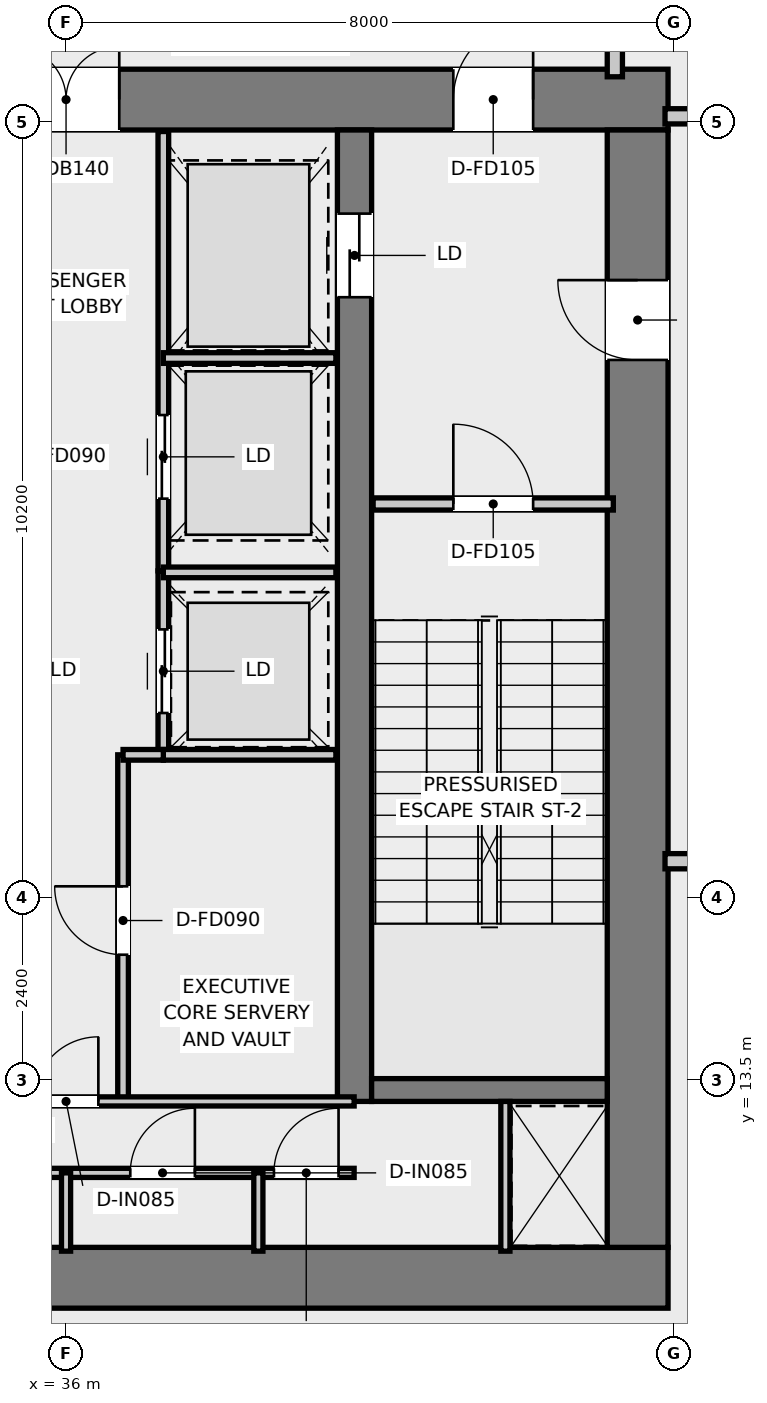
"""IFC4 building model, lengths in metres.
Left out: names, types, materials, properties, quantities, classifications, styles, units other than length and angle.
Written with IfcOpenShell. Run it as: python <this file> out.ifc"""

import sys

from ifc_helpers import new_model, si_unit, direction, frame, frame_2d, origin, place, context, subcontext, project, spatial, rectangle, extrude, element, fill, save


model = new_model("IFC4")
c1 = context("Model", 3, precision=1e-05, world=origin(), true_north=direction((0.0, 1.0)))
c2 = subcontext(c1, "Body", "Model", "MODEL_VIEW")
j1 = project(units=[si_unit("LENGTHUNIT", "METRE"), si_unit("PLANEANGLEUNIT", "RADIAN")], contexts=[c1])
p1 = place(None, origin())
s1 = spatial("IfcSite", under=j1, at=p1, CompositionType="ELEMENT")
p2 = place(p1, origin())
s2 = spatial("IfcBuilding", under=s1, at=p2, CompositionType="ELEMENT")
p3 = place(p2, frame((0.0, 0.0, 318.75)))
s3 = spatial("IfcBuildingStorey", under=s2, at=p3, CompositionType="ELEMENT", Elevation=318.75)
p4 = place(p3, frame((28.08, 10.9, 0.0), z_axis=(0.0, 0.0, 1.0), x_axis=(1.0, 0.0, 0.0)))
e1 = element("IfcWall", 1, at=p4, inside=s3, PredefinedType="SHEAR", context=c2, shape_type="SweptSolid", body=[
    extrude(rectangle(XDim=15.84, YDim=0.8, at=frame_2d((7.92, 0.0))), origin(), (0.0, 0.0, 1.0), 5.0),
])
p5 = place(p3, frame((28.08, 26.4, 0.0), z_axis=(0.0, 0.0, 1.0), x_axis=(1.0, 0.0, 0.0)))
e2 = element("IfcWall", 2, at=p5, inside=s3, PredefinedType="SHEAR", context=c2, shape_type="SweptSolid", body=[
    extrude(rectangle(XDim=15.84, YDim=0.8, at=frame_2d((7.92, 0.0))), origin(), (0.0, 0.0, 1.0), 5.0),
])
p6 = place(p5, frame((7.22, 0.0, 0.0)))
e3 = element("IfcOpeningElement", 3, at=p6, cuts=e2, PredefinedType="OPENING", context=c2, shape_type="SweptSolid", body=[
    extrude(rectangle(XDim=1.4, YDim=2.2, at=frame_2d((0.7, 1.1))), frame((0.0, 0.41, 0.0), z_axis=(0.0, -1.0, 0.0), x_axis=(1.0, 0.0, 0.0)), (0.0, 0.0, 1.0), 0.82),
])
p7 = place(p5, frame((1.775, 0.0, 0.0)))
e4 = element("IfcOpeningElement", 4, at=p7, cuts=e2, PredefinedType="OPENING", context=c2, shape_type="SweptSolid", body=[
    extrude(rectangle(XDim=1.05, YDim=2.1, at=frame_2d((0.525, 1.05))), frame((0.0, 0.41, 0.0), z_axis=(0.0, -1.0, 0.0), x_axis=(1.0, 0.0, 0.0)), (0.0, 0.0, 1.0), 0.82),
])
p8 = place(p5, frame((13.015, 0.0, 0.0)))
e5 = element("IfcOpeningElement", 5, at=p8, cuts=e2, PredefinedType="OPENING", context=c2, shape_type="SweptSolid", body=[
    extrude(rectangle(XDim=1.05, YDim=2.1, at=frame_2d((0.525, 1.05))), frame((0.0, 0.41, 0.0), z_axis=(0.0, -1.0, 0.0), x_axis=(1.0, 0.0, 0.0)), (0.0, 0.0, 1.0), 0.82),
])
p9 = place(p3, frame((43.52, 11.3, 0.0), z_axis=(0.0, 0.0, 1.0), x_axis=(0.0, 1.0, 0.0)))
e6 = element("IfcWall", 6, at=p9, inside=s3, PredefinedType="SHEAR", context=c2, shape_type="SweptSolid", body=[
    extrude(rectangle(XDim=14.7, YDim=0.8, at=frame_2d((7.35, 0.0))), origin(), (0.0, 0.0, 1.0), 5.0),
])
p10 = place(p9, frame((11.675, 0.0, 0.0)))
e7 = element("IfcOpeningElement", 7, at=p10, cuts=e6, PredefinedType="OPENING", context=c2, shape_type="SweptSolid", body=[
    extrude(rectangle(XDim=1.05, YDim=2.1, at=frame_2d((0.525, 1.05))), frame((0.0, 0.41, 0.0), z_axis=(0.0, -1.0, 0.0), x_axis=(1.0, 0.0, 0.0)), (0.0, 0.0, 1.0), 0.82),
])
p11 = place(p3, frame((39.795, 13.22, 0.0), z_axis=(0.0, 0.0, 1.0), x_axis=(0.0, 1.0, 0.0)))
e8 = element("IfcWall", 8, at=p11, inside=s3, PredefinedType="SHEAR", context=c2, shape_type="SweptSolid", body=[
    extrude(rectangle(XDim=12.78, YDim=0.45, at=frame_2d((6.39, 0.0))), origin(), (0.0, 0.0, 1.0), 5.0),
])
p12 = place(p11, frame((10.58, 0.0, 0.0)))
e9 = element("IfcOpeningElement", 9, at=p12, cuts=e8, PredefinedType="OPENING", context=c2, shape_type="SweptSolid", body=[
    extrude(rectangle(XDim=1.1, YDim=2.15, at=frame_2d((0.55, 1.075))), frame((0.0, 0.235, 0.0), z_axis=(0.0, -1.0, 0.0), x_axis=(1.0, 0.0, 0.0)), (0.0, 0.0, 1.0), 0.47),
])
p13 = place(p3, frame((40.02, 13.37, 0.0), z_axis=(0.0, 0.0, 1.0), x_axis=(1.0, 0.0, 0.0)))
e10 = element("IfcWall", 10, at=p13, inside=s3, PredefinedType="SHEAR", context=c2, shape_type="SweptSolid", body=[
    extrude(rectangle(XDim=3.1, YDim=0.3, at=frame_2d((1.55, 0.0))), origin(), (0.0, 0.0, 1.0), 5.0),
])
p14 = place(p3, frame((40.04, 21.08, 0.0), z_axis=(0.0, 0.0, 1.0), x_axis=(1.0, 0.0, 0.0)))
e11 = element("IfcWall", 11, at=p14, inside=s3, PredefinedType="PARTITIONING", context=c2, shape_type="SweptSolid", body=[
    extrude(rectangle(XDim=3.16, YDim=0.16, at=frame_2d((1.58, 0.0))), origin(), (0.0, 0.0, 1.0), 4.72),
])
p15 = place(p14, frame((1.055, 0.0, 0.0)))
e12 = element("IfcOpeningElement", 12, at=p15, cuts=e11, PredefinedType="OPENING", context=c2, shape_type="SweptSolid", body=[
    extrude(rectangle(XDim=1.05, YDim=2.1, at=frame_2d((0.525, 1.05))), frame((0.0, 0.09, 0.0), z_axis=(0.0, -1.0, 0.0), x_axis=(1.0, 0.0, 0.0)), (0.0, 0.0, 1.0), 0.18),
])
p16 = place(p3, frame((37.28, 20.2, 0.0), z_axis=(0.0, 0.0, 1.0), x_axis=(0.0, 1.0, 0.0)))
e13 = element("IfcWall", 13, at=p16, inside=s3, PredefinedType="PARTITIONING", context=c2, shape_type="SweptSolid", body=[
    extrude(rectangle(XDim=5.78, YDim=0.14, at=frame_2d((2.89, 0.0))), origin(), (0.0, 0.0, 1.0), 3.87),
])
p17 = place(p16, frame((0.95, 0.0, 0.0)))
e14 = element("IfcOpeningElement", 14, at=p17, cuts=e13, PredefinedType="OPENING", context=c2, shape_type="SweptSolid", body=[
    extrude(rectangle(XDim=1.1, YDim=2.15, at=frame_2d((0.55, 1.075))), frame((0.0, 0.08, 0.0), z_axis=(0.0, -1.0, 0.0), x_axis=(1.0, 0.0, 0.0)), (0.0, 0.0, 1.0), 0.16),
])
p18 = place(p3, frame((37.28, 23.0, 0.0), z_axis=(0.0, 0.0, 1.0), x_axis=(1.0, 0.0, 0.0)))
e15 = element("IfcWall", 15, at=p18, inside=s3, PredefinedType="PARTITIONING", context=c2, shape_type="SweptSolid", body=[
    extrude(rectangle(XDim=2.27, YDim=0.14, at=frame_2d((1.135, 0.0))), origin(), (0.0, 0.0, 1.0), 3.87),
])
p19 = place(p3, frame((37.28, 17.78, 0.0), z_axis=(0.0, 0.0, 1.0), x_axis=(0.0, 1.0, 0.0)))
e16 = element("IfcWall", 16, at=p19, inside=s3, PredefinedType="PARTITIONING", context=c2, shape_type="SweptSolid", body=[
    extrude(rectangle(XDim=2.42, YDim=0.14, at=frame_2d((1.21, 0.0))), origin(), (0.0, 0.0, 1.0), 4.72),
])
p20 = place(p19, frame((0.55, 0.0, 0.0)))
e17 = element("IfcOpeningElement", 17, at=p20, cuts=e16, PredefinedType="OPENING", context=c2, shape_type="SweptSolid", body=[
    extrude(rectangle(XDim=1.1, YDim=2.15, at=frame_2d((0.55, 1.075))), frame((0.0, 0.08, 0.0), z_axis=(0.0, -1.0, 0.0), x_axis=(1.0, 0.0, 0.0)), (0.0, 0.0, 1.0), 0.16),
])
for number, where, z_axis, x_axis in (
    (18, (37.28, 17.78, 0.0), (0.0, 0.0, 1.0), (1.0, 0.0, 0.0)),
    (19, (37.28, 20.18, 0.0), (0.0, 0.0, 1.0), (1.0, 0.0, 0.0)),
):
    element("IfcWall", number, at=place(p3, frame(where, z_axis=z_axis, x_axis=x_axis)), inside=s3, PredefinedType="PARTITIONING", context=c2, shape_type="SweptSolid", body=[
        extrude(rectangle(XDim=2.27, YDim=0.14, at=frame_2d((1.135, 0.0))), origin(), (0.0, 0.0, 1.0), 4.72),
    ])
p21 = place(p3, frame((36.75, 13.22, 0.0), z_axis=(0.0, 0.0, 1.0), x_axis=(0.0, 1.0, 0.0)))
e20 = element("IfcWall", 20, at=p21, inside=s3, PredefinedType="PARTITIONING", context=c2, shape_type="SweptSolid", body=[
    extrude(rectangle(XDim=4.56, YDim=0.14, at=frame_2d((2.28, 0.0))), origin(), (0.0, 0.0, 1.0), 4.72),
])
p22 = place(p21, frame((1.93, 0.0, 0.0)))
e21 = element("IfcOpeningElement", 21, at=p22, cuts=e20, PredefinedType="OPENING", context=c2, shape_type="SweptSolid", body=[
    extrude(rectangle(XDim=0.9, YDim=2.1, at=frame_2d((0.45, 1.05))), frame((0.0, 0.08, 0.0), z_axis=(0.0, -1.0, 0.0), x_axis=(1.0, 0.0, 0.0)), (0.0, 0.0, 1.0), 0.16),
])
p23 = place(p3, frame((36.75, 17.78, 0.0), z_axis=(0.0, 0.0, 1.0), x_axis=(1.0, 0.0, 0.0)))
e22 = element("IfcWall", 22, at=p23, inside=s3, PredefinedType="PARTITIONING", context=c2, shape_type="SweptSolid", body=[
    extrude(rectangle(XDim=0.53, YDim=0.14, at=frame_2d((0.265, 0.0))), origin(), (0.0, 0.0, 1.0), 4.72),
])
p24 = place(p3, frame((41.78, 11.25, 0.0), z_axis=(0.0, 0.0, 1.0), x_axis=(0.0, 1.0, 0.0)))
e23 = element("IfcWall", 23, at=p24, inside=s3, PredefinedType="PARTITIONING", context=c2, shape_type="SweptSolid", body=[
    extrude(rectangle(XDim=1.97, YDim=0.12, at=frame_2d((0.985, 0.0))), origin(), (0.0, 0.0, 1.0), 4.72),
])
p25 = place(p3, frame((32.21, 13.22, 0.0), z_axis=(0.0, 0.0, 1.0), x_axis=(1.0, 0.0, 0.0)))
e24 = element("IfcWall", 24, at=p25, inside=s3, PredefinedType="PARTITIONING", context=c2, shape_type="SweptSolid", body=[
    extrude(rectangle(XDim=7.58, YDim=0.12, at=frame_2d((3.79, 0.0))), origin(), (0.0, 0.0, 1.0), 4.72),
])
p26 = place(p25, frame((3.365, 0.0, 0.0)))
e25 = element("IfcOpeningElement", 25, at=p26, cuts=e24, PredefinedType="OPENING", context=c2, shape_type="SweptSolid", body=[
    extrude(rectangle(XDim=0.85, YDim=2.1, at=frame_2d((0.425, 1.05))), frame((0.0, 0.07, 0.0), z_axis=(0.0, -1.0, 0.0), x_axis=(1.0, 0.0, 0.0)), (0.0, 0.0, 1.0), 0.14),
])
p27 = place(p3, frame((32.21, 12.28, 0.0), z_axis=(0.0, 0.0, 1.0), x_axis=(1.0, 0.0, 0.0)))
e26 = element("IfcWall", 26, at=p27, inside=s3, PredefinedType="PARTITIONING", context=c2, shape_type="SweptSolid", body=[
    extrude(rectangle(XDim=7.58, YDim=0.12, at=frame_2d((3.79, 0.0))), origin(), (0.0, 0.0, 1.0), 4.72),
])
p28 = place(p27, frame((0.205, 0.0, 0.0)))
e27 = element("IfcOpeningElement", 27, at=p28, cuts=e26, PredefinedType="OPENING", context=c2, shape_type="SweptSolid", body=[
    extrude(rectangle(XDim=0.85, YDim=2.1, at=frame_2d((0.425, 1.05))), frame((0.0, 0.07, 0.0), z_axis=(0.0, -1.0, 0.0), x_axis=(1.0, 0.0, 0.0)), (0.0, 0.0, 1.0), 0.14),
])
p29 = place(p27, frame((2.095, 0.0, 0.0)))
e28 = element("IfcOpeningElement", 28, at=p29, cuts=e26, PredefinedType="OPENING", context=c2, shape_type="SweptSolid", body=[
    extrude(rectangle(XDim=0.85, YDim=2.1, at=frame_2d((0.425, 1.05))), frame((0.0, 0.07, 0.0), z_axis=(0.0, -1.0, 0.0), x_axis=(1.0, 0.0, 0.0)), (0.0, 0.0, 1.0), 0.14),
])
p30 = place(p27, frame((4.635, 0.0, 0.0)))
e29 = element("IfcOpeningElement", 29, at=p30, cuts=e26, PredefinedType="OPENING", context=c2, shape_type="SweptSolid", body=[
    extrude(rectangle(XDim=0.85, YDim=2.1, at=frame_2d((0.425, 1.05))), frame((0.0, 0.07, 0.0), z_axis=(0.0, -1.0, 0.0), x_axis=(1.0, 0.0, 0.0)), (0.0, 0.0, 1.0), 0.14),
])
p31 = place(p27, frame((6.525, 0.0, 0.0)))
e30 = element("IfcOpeningElement", 30, at=p31, cuts=e26, PredefinedType="OPENING", context=c2, shape_type="SweptSolid", body=[
    extrude(rectangle(XDim=0.85, YDim=2.1, at=frame_2d((0.425, 1.05))), frame((0.0, 0.07, 0.0), z_axis=(0.0, -1.0, 0.0), x_axis=(1.0, 0.0, 0.0)), (0.0, 0.0, 1.0), 0.14),
])
for number, where, z_axis, x_axis in (
    (31, (36.0, 11.25, 0.0), (0.0, 0.0, 1.0), (0.0, 1.0, 0.0)),
    (32, (38.53, 11.25, 0.0), (0.0, 0.0, 1.0), (0.0, 1.0, 0.0)),
):
    element("IfcWall", number, at=place(p3, frame(where, z_axis=z_axis, x_axis=x_axis)), inside=s3, PredefinedType="PARTITIONING", context=c2, shape_type="SweptSolid", body=[
        extrude(rectangle(XDim=1.03, YDim=0.12, at=frame_2d((0.515, 0.0))), origin(), (0.0, 0.0, 1.0), 4.72),
    ])
p32 = place(p3, frame((43.22, 26.7, 0.0), z_axis=(0.0, 0.0, 1.0), x_axis=(0.0, 1.0, 0.0)))
e33 = element("IfcWall", 33, at=p32, inside=s3, PredefinedType="SOLIDWALL", context=c2, shape_type="SweptSolid", body=[
    extrude(rectangle(XDim=12.6, YDim=0.2, at=frame_2d((6.3, 0.0))), origin(), (0.0, 0.0, 1.0), 4.18),
])
p33 = place(p3, frame((43.88, 16.38, 0.0), z_axis=(0.0, 0.0, 1.0), x_axis=(1.0, 0.0, 0.0)))
e34 = element("IfcWall", 34, at=p33, inside=s3, PredefinedType="SOLIDWALL", context=c2, shape_type="SweptSolid", body=[
    extrude(rectangle(XDim=6.07, YDim=0.2, at=frame_2d((3.035, 0.0))), origin(), (0.0, 0.0, 1.0), 4.18),
])
p34 = place(p3, frame((43.88, 26.18, 0.0), z_axis=(0.0, 0.0, 1.0), x_axis=(1.0, 0.0, 0.0)))
e35 = element("IfcWall", 35, at=p34, inside=s3, PredefinedType="SOLIDWALL", context=c2, shape_type="SweptSolid", body=[
    extrude(rectangle(XDim=3.54, YDim=0.2, at=frame_2d((1.77, 0.0))), origin(), (0.0, 0.0, 1.0), 4.18),
])
p35 = place(p15, origin())
e36 = element("IfcDoor", 36, at=p35, inside=s3, OperationType="SINGLE_SWING_LEFT", PredefinedType="DOOR", context=c2, shape_type="SweptSolid", body=[
    extrude(rectangle(XDim=1.05, YDim=2.1, at=frame_2d((0.525, 1.05))), frame((0.0, 0.025, 0.0), z_axis=(0.0, -1.0, 0.0), x_axis=(1.0, 0.0, 0.0)), (0.0, 0.0, 1.0), 0.05),
])
fill(e12, e36)
p36 = place(p6, origin())
e37 = element("IfcDoor", 37, at=p36, inside=s3, OperationType="DOUBLE_DOOR_SINGLE_SWING", PredefinedType="DOOR", context=c2, shape_type="SweptSolid", body=[
    extrude(rectangle(XDim=1.4, YDim=2.2, at=frame_2d((0.7, 1.1))), frame((0.0, 0.025, 0.0), z_axis=(0.0, -1.0, 0.0), x_axis=(1.0, 0.0, 0.0)), (0.0, 0.0, 1.0), 0.05),
])
fill(e3, e37)
p37 = place(p8, origin())
e38 = element("IfcDoor", 38, at=p37, inside=s3, OperationType="SINGLE_SWING_RIGHT", PredefinedType="DOOR", context=c2, shape_type="SweptSolid", body=[
    extrude(rectangle(XDim=1.05, YDim=2.1, at=frame_2d((0.525, 1.05))), frame((0.0, 0.025, 0.0), z_axis=(0.0, -1.0, 0.0), x_axis=(1.0, 0.0, 0.0)), (0.0, 0.0, 1.0), 0.05),
])
fill(e5, e38)
p38 = place(p10, origin())
e39 = element("IfcDoor", 39, at=p38, inside=s3, OperationType="SINGLE_SWING_RIGHT", PredefinedType="DOOR", context=c2, shape_type="SweptSolid", body=[
    extrude(rectangle(XDim=1.05, YDim=2.1, at=frame_2d((0.525, 1.05))), frame((0.0, 0.025, 0.0), z_axis=(0.0, -1.0, 0.0), x_axis=(1.0, 0.0, 0.0)), (0.0, 0.0, 1.0), 0.05),
])
fill(e7, e39)
p39 = place(p12, origin())
e40 = element("IfcDoor", 40, at=p39, inside=s3, OperationType="DOUBLE_DOOR_SLIDING", PredefinedType="DOOR", context=c2, shape_type="SweptSolid", body=[
    extrude(rectangle(XDim=1.1, YDim=2.15, at=frame_2d((0.55, 1.075))), frame((0.0, 0.025, 0.0), z_axis=(0.0, -1.0, 0.0), x_axis=(1.0, 0.0, 0.0)), (0.0, 0.0, 1.0), 0.05),
])
fill(e9, e40)
p40 = place(p17, origin())
e41 = element("IfcDoor", 41, at=p40, inside=s3, OperationType="DOUBLE_DOOR_SLIDING", PredefinedType="DOOR", context=c2, shape_type="SweptSolid", body=[
    extrude(rectangle(XDim=1.1, YDim=2.15, at=frame_2d((0.55, 1.075))), frame((0.0, 0.025, 0.0), z_axis=(0.0, -1.0, 0.0), x_axis=(1.0, 0.0, 0.0)), (0.0, 0.0, 1.0), 0.05),
])
fill(e14, e41)
p41 = place(p20, origin())
e42 = element("IfcDoor", 42, at=p41, inside=s3, OperationType="DOUBLE_DOOR_SLIDING", PredefinedType="DOOR", context=c2, shape_type="SweptSolid", body=[
    extrude(rectangle(XDim=1.1, YDim=2.15, at=frame_2d((0.55, 1.075))), frame((0.0, 0.025, 0.0), z_axis=(0.0, -1.0, 0.0), x_axis=(1.0, 0.0, 0.0)), (0.0, 0.0, 1.0), 0.05),
])
fill(e17, e42)
p42 = place(p22, origin())
e43 = element("IfcDoor", 43, at=p42, inside=s3, OperationType="SINGLE_SWING_RIGHT", PredefinedType="DOOR", context=c2, shape_type="SweptSolid", body=[
    extrude(rectangle(XDim=0.9, YDim=2.1, at=frame_2d((0.45, 1.05))), frame((0.0, 0.025, 0.0), z_axis=(0.0, -1.0, 0.0), x_axis=(1.0, 0.0, 0.0)), (0.0, 0.0, 1.0), 0.05),
])
fill(e21, e43)
p43 = place(p26, origin())
e44 = element("IfcDoor", 44, at=p43, inside=s3, OperationType="SINGLE_SWING_RIGHT", PredefinedType="DOOR", context=c2, shape_type="SweptSolid", body=[
    extrude(rectangle(XDim=0.85, YDim=2.1, at=frame_2d((0.425, 1.05))), frame((0.0, 0.025, 0.0), z_axis=(0.0, -1.0, 0.0), x_axis=(1.0, 0.0, 0.0)), (0.0, 0.0, 1.0), 0.05),
])
fill(e25, e44)
p44 = place(p30, origin())
e45 = element("IfcDoor", 45, at=p44, inside=s3, OperationType="SINGLE_SWING_RIGHT", PredefinedType="DOOR", context=c2, shape_type="SweptSolid", body=[
    extrude(rectangle(XDim=0.85, YDim=2.1, at=frame_2d((0.425, 1.05))), frame((0.0, 0.025, 0.0), z_axis=(0.0, -1.0, 0.0), x_axis=(1.0, 0.0, 0.0)), (0.0, 0.0, 1.0), 0.05),
])
fill(e29, e45)
p45 = place(p31, origin())
e46 = element("IfcDoor", 46, at=p45, inside=s3, OperationType="SINGLE_SWING_RIGHT", PredefinedType="DOOR", context=c2, shape_type="SweptSolid", body=[
    extrude(rectangle(XDim=0.85, YDim=2.1, at=frame_2d((0.425, 1.05))), frame((0.0, 0.025, 0.0), z_axis=(0.0, -1.0, 0.0), x_axis=(1.0, 0.0, 0.0)), (0.0, 0.0, 1.0), 0.05),
])
fill(e30, e46)
save(model, sys.argv[1])
